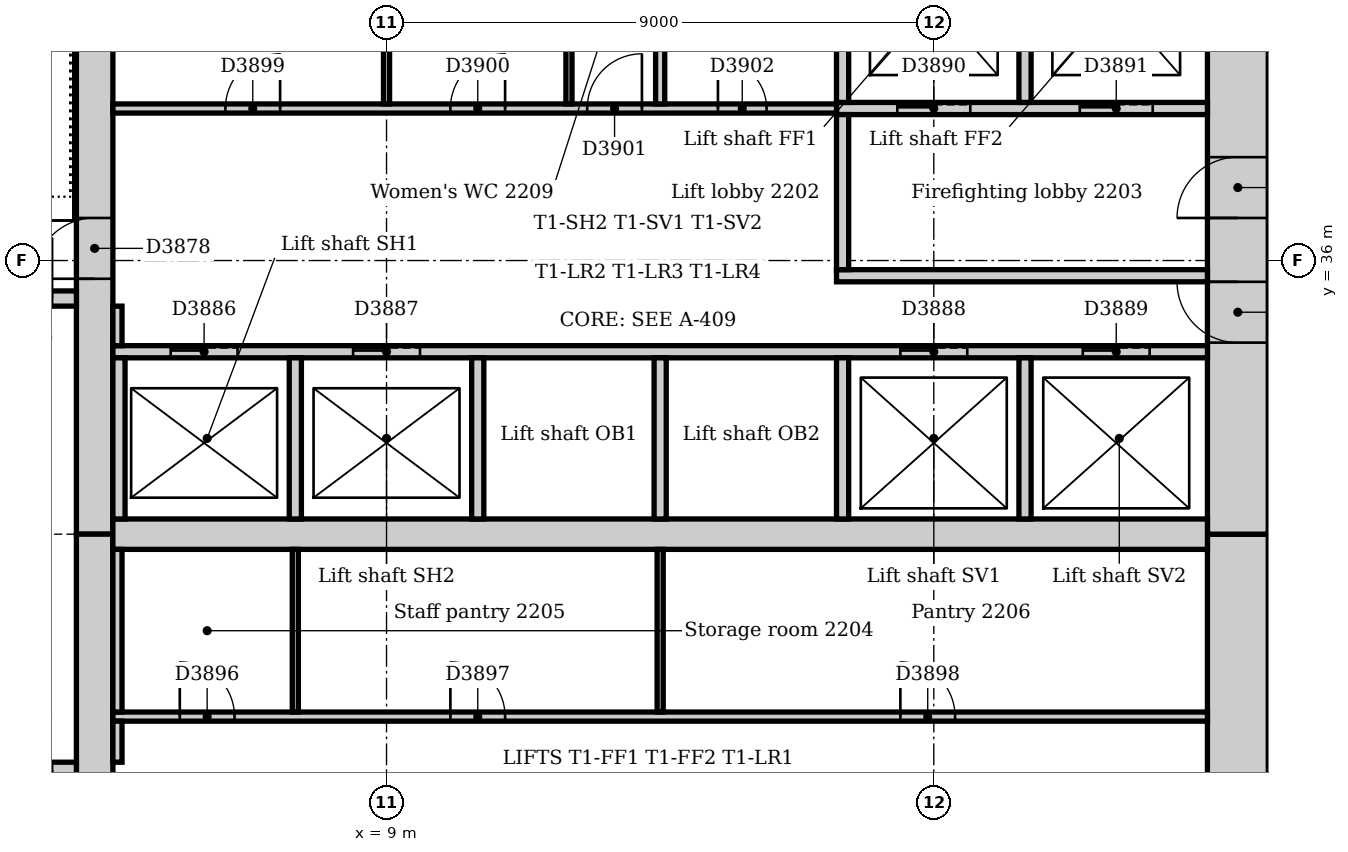
"""IFC4 building model, lengths in metres.
Left out: names, types, materials, properties, quantities, classifications, styles, units other than length and angle.
Written with IfcOpenShell. Run it as: python <this file> out.ifc"""

import sys

from ifc_helpers import new_model, si_unit, direction, frame, frame_2d, origin, place, context, subcontext, project, spatial, rectangle, extrude, element, fill, save


model = new_model("IFC4")
c1 = context("Model", 3, precision=1e-05, world=origin(), true_north=direction((0.0, 1.0)))
c2 = subcontext(c1, "Body", "Model", "MODEL_VIEW")
j1 = project(units=[si_unit("LENGTHUNIT", "METRE"), si_unit("PLANEANGLEUNIT", "RADIAN")], contexts=[c1])
p1 = place(None, origin())
s1 = spatial("IfcSite", under=j1, at=p1, CompositionType="ELEMENT")
p2 = place(p1, origin())
s2 = spatial("IfcBuilding", under=s1, at=p2, CompositionType="ELEMENT")
p3 = place(p2, frame((0.0, 0.0, 95.0)))
s3 = spatial("IfcBuildingStorey", under=s2, at=p3, CompositionType="ELEMENT", Elevation=95.0)
p4 = place(p3, frame((23.0, 21.0, 0.0), z_axis=(0.0, 0.0, 1.0), x_axis=(0.0, 1.0, 0.0)))
e1 = element("IfcWall", 1, at=p4, inside=s3, PredefinedType="SOLIDWALL", context=c2, shape_type="SweptSolid", body=[
    extrude(rectangle(XDim=10.5, YDim=1.0, at=frame_2d((5.25, 0.0))), origin(), (0.0, 0.0, 1.0), 5.0),
])
p5 = place(p4, frame((4.35, 0.0, 0.0)))
e2 = element("IfcOpeningElement", 2, at=p5, cuts=e1, PredefinedType="OPENING", context=c2, shape_type="SweptSolid", body=[
    extrude(rectangle(XDim=1.8, YDim=2.1, at=frame_2d((0.9, 1.05))), frame((0.0, 0.51, 0.0), z_axis=(0.0, -1.0, 0.0), x_axis=(1.0, 0.0, 0.0)), (0.0, 0.0, 1.0), 1.02),
])
p6 = place(p3, frame((23.0, 31.5, 0.0), z_axis=(0.0, 0.0, 1.0), x_axis=(0.0, 1.0, 0.0)))
e3 = element("IfcWall", 3, at=p6, inside=s3, PredefinedType="SOLIDWALL", context=c2, shape_type="SweptSolid", body=[
    extrude(rectangle(XDim=10.5, YDim=1.0, at=frame_2d((5.25, 0.0))), origin(), (0.0, 0.0, 1.0), 5.0),
])
p7 = place(p6, frame((3.15, 0.0, 0.0)))
e4 = element("IfcOpeningElement", 4, at=p7, cuts=e3, PredefinedType="OPENING", context=c2, shape_type="SweptSolid", body=[
    extrude(rectangle(XDim=1.0, YDim=2.1, at=frame_2d((0.5, 1.05))), frame((0.0, 0.51, 0.0), z_axis=(0.0, -1.0, 0.0), x_axis=(1.0, 0.0, 0.0)), (0.0, 0.0, 1.0), 1.02),
])
p8 = place(p6, frame((5.2, 0.0, 0.0)))
e5 = element("IfcOpeningElement", 5, at=p8, cuts=e3, PredefinedType="OPENING", context=c2, shape_type="SweptSolid", body=[
    extrude(rectangle(XDim=1.0, YDim=2.1, at=frame_2d((0.5, 1.05))), frame((0.0, 0.51, 0.0), z_axis=(0.0, -1.0, 0.0), x_axis=(1.0, 0.0, 0.0)), (0.0, 0.0, 1.0), 1.02),
])
p9 = place(p3, frame((4.2, 42.0, 0.0), z_axis=(0.0, 0.0, 1.0), x_axis=(0.0, -1.0, 0.0)))
e6 = element("IfcWall", 6, at=p9, inside=s3, PredefinedType="SOLIDWALL", context=c2, shape_type="SweptSolid", body=[
    extrude(rectangle(XDim=10.5, YDim=0.6, at=frame_2d((5.25, 0.0))), origin(), (0.0, 0.0, 1.0), 5.0),
])
p10 = place(p9, frame((5.3, 0.0, 0.0)))
e7 = element("IfcOpeningElement", 7, at=p10, cuts=e6, PredefinedType="OPENING", context=c2, shape_type="SweptSolid", body=[
    extrude(rectangle(XDim=1.0, YDim=2.1, at=frame_2d((0.5, 1.05))), frame((0.0, 0.31, 0.0), z_axis=(0.0, -1.0, 0.0), x_axis=(1.0, 0.0, 0.0)), (0.0, 0.0, 1.0), 0.62),
])
p11 = place(p3, frame((4.2, 31.5, 0.0), z_axis=(0.0, 0.0, 1.0), x_axis=(0.0, -1.0, 0.0)))
e8 = element("IfcWall", 8, at=p11, inside=s3, PredefinedType="SOLIDWALL", context=c2, shape_type="SweptSolid", body=[
    extrude(rectangle(XDim=10.5, YDim=0.6, at=frame_2d((5.25, 0.0))), origin(), (0.0, 0.0, 1.0), 5.0),
])
p12 = place(p11, frame((4.25, 0.0, 0.0)))
e9 = element("IfcOpeningElement", 9, at=p12, cuts=e8, PredefinedType="OPENING", context=c2, shape_type="SweptSolid", body=[
    extrude(rectangle(XDim=1.0, YDim=2.1, at=frame_2d((0.5, 1.05))), frame((0.0, 0.31, 0.0), z_axis=(0.0, -1.0, 0.0), x_axis=(1.0, 0.0, 0.0)), (0.0, 0.0, 1.0), 0.62),
])
p13 = place(p3, frame((4.5, 31.5, 0.0), z_axis=(0.0, 0.0, 1.0), x_axis=(1.0, 0.0, 0.0)))
e10 = element("IfcWall", 10, at=p13, inside=s3, PredefinedType="SOLIDWALL", context=c2, shape_type="SweptSolid", body=[
    extrude(rectangle(XDim=18.0, YDim=0.5, at=frame_2d((9.0, 0.0))), origin(), (0.0, 0.0, 1.0), 5.0),
])
p14 = place(p3, frame((3.9, 27.625, 0.0), z_axis=(0.0, 0.0, 1.0), x_axis=(-1.0, 0.0, 0.0)))
e11 = element("IfcWall", 11, at=p14, inside=s3, PredefinedType="SOLIDWALL", context=c2, shape_type="SweptSolid", body=[
    extrude(rectangle(XDim=3.54, YDim=0.25, at=frame_2d((1.77, 0.0))), origin(), (0.0, 0.0, 1.0), 5.0),
])
p15 = place(p14, frame((0.4, 0.0, 0.0)))
e12 = element("IfcOpeningElement", 12, at=p15, cuts=e11, PredefinedType="OPENING", context=c2, shape_type="SweptSolid", body=[
    extrude(rectangle(XDim=1.0, YDim=2.1, at=frame_2d((0.5, 1.05))), frame((0.0, 0.135, 0.0), z_axis=(0.0, -1.0, 0.0), x_axis=(1.0, 0.0, 0.0)), (0.0, 0.0, 1.0), 0.27),
])
p16 = place(p3, frame((0.36, 35.375, 0.0), z_axis=(0.0, 0.0, 1.0), x_axis=(1.0, 0.0, 0.0)))
e13 = element("IfcWall", 13, at=p16, inside=s3, PredefinedType="SOLIDWALL", context=c2, shape_type="SweptSolid", body=[
    extrude(rectangle(XDim=3.54, YDim=0.25, at=frame_2d((1.77, 0.0))), origin(), (0.0, 0.0, 1.0), 5.0),
])
p17 = place(p16, frame((2.14, 0.0, 0.0)))
e14 = element("IfcOpeningElement", 14, at=p17, cuts=e13, PredefinedType="OPENING", context=c2, shape_type="SweptSolid", body=[
    extrude(rectangle(XDim=1.0, YDim=2.1, at=frame_2d((0.5, 1.05))), frame((0.0, 0.135, 0.0), z_axis=(0.0, -1.0, 0.0), x_axis=(1.0, 0.0, 0.0)), (0.0, 0.0, 1.0), 0.27),
])
p18 = place(p3, frame((16.4, 35.75, 0.0), z_axis=(0.0, 0.0, 1.0), x_axis=(1.0, 0.0, 0.0)))
e15 = element("IfcWall", 15, at=p18, inside=s3, PredefinedType="PARTITIONING", context=c2, shape_type="SweptSolid", body=[
    extrude(rectangle(XDim=6.1, YDim=0.2, at=frame_2d((3.05, 0.0))), origin(), (0.0, 0.0, 1.0), 4.85),
])
p19 = place(p3, frame((16.4, 38.5, 0.0), z_axis=(0.0, 0.0, 1.0), x_axis=(1.0, 0.0, 0.0)))
e16 = element("IfcWall", 16, at=p19, inside=s3, PredefinedType="PARTITIONING", context=c2, shape_type="SweptSolid", body=[
    extrude(rectangle(XDim=6.1, YDim=0.2, at=frame_2d((3.05, 0.0))), origin(), (0.0, 0.0, 1.0), 4.85),
])
p20 = place(p19, frame((1.0, 0.0, 0.0)))
e17 = element("IfcOpeningElement", 17, at=p20, cuts=e16, PredefinedType="OPENING", context=c2, shape_type="SweptSolid", body=[
    extrude(rectangle(XDim=1.2, YDim=2.1, at=frame_2d((0.6, 1.05))), frame((0.0, 0.11, 0.0), z_axis=(0.0, -1.0, 0.0), x_axis=(1.0, 0.0, 0.0)), (0.0, 0.0, 1.0), 0.22),
])
p21 = place(p19, frame((4.0, 0.0, 0.0)))
e18 = element("IfcOpeningElement", 18, at=p21, cuts=e16, PredefinedType="OPENING", context=c2, shape_type="SweptSolid", body=[
    extrude(rectangle(XDim=1.2, YDim=2.1, at=frame_2d((0.6, 1.05))), frame((0.0, 0.11, 0.0), z_axis=(0.0, -1.0, 0.0), x_axis=(1.0, 0.0, 0.0)), (0.0, 0.0, 1.0), 0.22),
])
p22 = place(p3, frame((16.5, 35.85, 0.0), z_axis=(0.0, 0.0, 1.0), x_axis=(0.0, 1.0, 0.0)))
e19 = element("IfcWall", 19, at=p22, inside=s3, PredefinedType="PARTITIONING", context=c2, shape_type="SweptSolid", body=[
    extrude(rectangle(XDim=2.55, YDim=0.2, at=frame_2d((1.275, 0.0))), origin(), (0.0, 0.0, 1.0), 4.85),
])
p23 = place(p3, frame((4.5, 34.5, 0.0), z_axis=(0.0, 0.0, 1.0), x_axis=(1.0, 0.0, 0.0)))
e20 = element("IfcWall", 20, at=p23, inside=s3, PredefinedType="PARTITIONING", context=c2, shape_type="SweptSolid", body=[
    extrude(rectangle(XDim=18.0, YDim=0.2, at=frame_2d((9.0, 0.0))), origin(), (0.0, 0.0, 1.0), 4.85),
])
p24 = place(p23, frame((0.95, 0.0, 0.0)))
e21 = element("IfcOpeningElement", 21, at=p24, cuts=e20, PredefinedType="OPENING", context=c2, shape_type="SweptSolid", body=[
    extrude(rectangle(XDim=1.1, YDim=2.1, at=frame_2d((0.55, 1.05))), frame((0.0, 0.11, 0.0), z_axis=(0.0, -1.0, 0.0), x_axis=(1.0, 0.0, 0.0)), (0.0, 0.0, 1.0), 0.22),
])
p25 = place(p23, frame((3.95, 0.0, 0.0)))
e22 = element("IfcOpeningElement", 22, at=p25, cuts=e20, PredefinedType="OPENING", context=c2, shape_type="SweptSolid", body=[
    extrude(rectangle(XDim=1.1, YDim=2.1, at=frame_2d((0.55, 1.05))), frame((0.0, 0.11, 0.0), z_axis=(0.0, -1.0, 0.0), x_axis=(1.0, 0.0, 0.0)), (0.0, 0.0, 1.0), 0.22),
])
p26 = place(p23, frame((12.95, 0.0, 0.0)))
e23 = element("IfcOpeningElement", 23, at=p26, cuts=e20, PredefinedType="OPENING", context=c2, shape_type="SweptSolid", body=[
    extrude(rectangle(XDim=1.1, YDim=2.1, at=frame_2d((0.55, 1.05))), frame((0.0, 0.11, 0.0), z_axis=(0.0, -1.0, 0.0), x_axis=(1.0, 0.0, 0.0)), (0.0, 0.0, 1.0), 0.22),
])
p27 = place(p23, frame((15.95, 0.0, 0.0)))
e24 = element("IfcOpeningElement", 24, at=p27, cuts=e20, PredefinedType="OPENING", context=c2, shape_type="SweptSolid", body=[
    extrude(rectangle(XDim=1.1, YDim=2.1, at=frame_2d((0.55, 1.05))), frame((0.0, 0.11, 0.0), z_axis=(0.0, -1.0, 0.0), x_axis=(1.0, 0.0, 0.0)), (0.0, 0.0, 1.0), 0.22),
])
for number, where, z_axis, x_axis in (
    (25, (16.5, 38.6, 0.0), (0.0, 0.0, 1.0), (0.0, 1.0, 0.0)),
    (26, (19.5, 38.6, 0.0), (0.0, 0.0, 1.0), (0.0, 1.0, 0.0)),
):
    element("IfcWall", number, at=place(p3, frame(where, z_axis=z_axis, x_axis=x_axis)), inside=s3, PredefinedType="PARTITIONING", context=c2, shape_type="SweptSolid", body=[
        extrude(rectangle(XDim=3.4, YDim=0.2, at=frame_2d((1.7, 0.0))), origin(), (0.0, 0.0, 1.0), 4.85),
    ])
for number, where, z_axis, x_axis in (
    (27, (4.6, 31.75, 0.0), (0.0, 0.0, 1.0), (0.0, 1.0, 0.0)),
    (28, (7.5, 31.75, 0.0), (0.0, 0.0, 1.0), (0.0, 1.0, 0.0)),
    (29, (10.5, 31.75, 0.0), (0.0, 0.0, 1.0), (0.0, 1.0, 0.0)),
    (30, (13.5, 31.75, 0.0), (0.0, 0.0, 1.0), (0.0, 1.0, 0.0)),
    (31, (16.5, 31.75, 0.0), (0.0, 0.0, 1.0), (0.0, 1.0, 0.0)),
    (32, (19.5, 31.75, 0.0), (0.0, 0.0, 1.0), (0.0, 1.0, 0.0)),
):
    element("IfcWall", number, at=place(p3, frame(where, z_axis=z_axis, x_axis=x_axis)), inside=s3, PredefinedType="PARTITIONING", context=c2, shape_type="SweptSolid", body=[
        extrude(rectangle(XDim=2.65, YDim=0.2, at=frame_2d((1.325, 0.0))), origin(), (0.0, 0.0, 1.0), 4.85),
    ])
p28 = place(p3, frame((4.5, 28.5, 0.0), z_axis=(0.0, 0.0, 1.0), x_axis=(1.0, 0.0, 0.0)))
e33 = element("IfcWall", 33, at=p28, inside=s3, PredefinedType="PARTITIONING", context=c2, shape_type="SweptSolid", body=[
    extrude(rectangle(XDim=18.0, YDim=0.15, at=frame_2d((9.0, 0.0))), origin(), (0.0, 0.0, 1.0), 4.85),
])
p29 = place(p28, frame((1.1, 0.0, 0.0)))
e34 = element("IfcOpeningElement", 34, at=p29, cuts=e33, PredefinedType="OPENING", context=c2, shape_type="SweptSolid", body=[
    extrude(rectangle(XDim=0.9, YDim=2.1, at=frame_2d((0.45, 1.05))), frame((0.0, 0.085, 0.0), z_axis=(0.0, -1.0, 0.0), x_axis=(1.0, 0.0, 0.0)), (0.0, 0.0, 1.0), 0.17),
])
p30 = place(p28, frame((5.55, 0.0, 0.0)))
e35 = element("IfcOpeningElement", 35, at=p30, cuts=e33, PredefinedType="OPENING", context=c2, shape_type="SweptSolid", body=[
    extrude(rectangle(XDim=0.9, YDim=2.1, at=frame_2d((0.45, 1.05))), frame((0.0, 0.085, 0.0), z_axis=(0.0, -1.0, 0.0), x_axis=(1.0, 0.0, 0.0)), (0.0, 0.0, 1.0), 0.17),
])
p31 = place(p28, frame((12.95, 0.0, 0.0)))
e36 = element("IfcOpeningElement", 36, at=p31, cuts=e33, PredefinedType="OPENING", context=c2, shape_type="SweptSolid", body=[
    extrude(rectangle(XDim=0.9, YDim=2.1, at=frame_2d((0.45, 1.05))), frame((0.0, 0.085, 0.0), z_axis=(0.0, -1.0, 0.0), x_axis=(1.0, 0.0, 0.0)), (0.0, 0.0, 1.0), 0.17),
])
p32 = place(p3, frame((4.5, 38.5, 0.0), z_axis=(0.0, 0.0, 1.0), x_axis=(1.0, 0.0, 0.0)))
e37 = element("IfcWall", 37, at=p32, inside=s3, PredefinedType="PARTITIONING", context=c2, shape_type="SweptSolid", body=[
    extrude(rectangle(XDim=11.9, YDim=0.15, at=frame_2d((5.95, 0.0))), origin(), (0.0, 0.0, 1.0), 4.85),
])
p33 = place(p32, frame((1.85, 0.0, 0.0)))
e38 = element("IfcOpeningElement", 38, at=p33, cuts=e37, PredefinedType="OPENING", context=c2, shape_type="SweptSolid", body=[
    extrude(rectangle(XDim=0.9, YDim=2.1, at=frame_2d((0.45, 1.05))), frame((0.0, 0.085, 0.0), z_axis=(0.0, -1.0, 0.0), x_axis=(1.0, 0.0, 0.0)), (0.0, 0.0, 1.0), 0.17),
])
p34 = place(p32, frame((5.55, 0.0, 0.0)))
e39 = element("IfcOpeningElement", 39, at=p34, cuts=e37, PredefinedType="OPENING", context=c2, shape_type="SweptSolid", body=[
    extrude(rectangle(XDim=0.9, YDim=2.1, at=frame_2d((0.45, 1.05))), frame((0.0, 0.085, 0.0), z_axis=(0.0, -1.0, 0.0), x_axis=(1.0, 0.0, 0.0)), (0.0, 0.0, 1.0), 0.17),
])
p35 = place(p32, frame((7.8, 0.0, 0.0)))
e40 = element("IfcOpeningElement", 40, at=p35, cuts=e37, PredefinedType="OPENING", context=c2, shape_type="SweptSolid", body=[
    extrude(rectangle(XDim=0.9, YDim=2.1, at=frame_2d((0.45, 1.05))), frame((0.0, 0.085, 0.0), z_axis=(0.0, -1.0, 0.0), x_axis=(1.0, 0.0, 0.0)), (0.0, 0.0, 1.0), 0.17),
])
p36 = place(p32, frame((9.95, 0.0, 0.0)))
e41 = element("IfcOpeningElement", 41, at=p36, cuts=e37, PredefinedType="OPENING", context=c2, shape_type="SweptSolid", body=[
    extrude(rectangle(XDim=0.8, YDim=2.1, at=frame_2d((0.4, 1.05))), frame((0.0, 0.085, 0.0), z_axis=(0.0, -1.0, 0.0), x_axis=(1.0, 0.0, 0.0)), (0.0, 0.0, 1.0), 0.17),
])
p37 = place(p3, frame((4.575, 27.75, 0.0), z_axis=(0.0, 0.0, 1.0), x_axis=(0.0, 1.0, 0.0)))
e42 = element("IfcWall", 42, at=p37, inside=s3, PredefinedType="PARTITIONING", context=c2, shape_type="SweptSolid", body=[
    extrude(rectangle(XDim=0.675, YDim=0.15, at=frame_2d((0.338, 0.0))), origin(), (0.0, 0.0, 1.0), 4.85),
])
p38 = place(p3, frame((4.575, 28.575, 0.0), z_axis=(0.0, 0.0, 1.0), x_axis=(0.0, 1.0, 0.0)))
e43 = element("IfcWall", 43, at=p38, inside=s3, PredefinedType="PARTITIONING", context=c2, shape_type="SweptSolid", body=[
    extrude(rectangle(XDim=2.675, YDim=0.15, at=frame_2d((1.337, 0.0))), origin(), (0.0, 0.0, 1.0), 4.85),
])
p39 = place(p3, frame((4.575, 34.6, 0.0), z_axis=(0.0, 0.0, 1.0), x_axis=(0.0, 1.0, 0.0)))
e44 = element("IfcWall", 44, at=p39, inside=s3, PredefinedType="PARTITIONING", context=c2, shape_type="SweptSolid", body=[
    extrude(rectangle(XDim=0.65, YDim=0.15, at=frame_2d((0.325, 0.0))), origin(), (0.0, 0.0, 1.0), 4.85),
])
p40 = place(p3, frame((13.5, 38.575, 0.0), z_axis=(0.0, 0.0, 1.0), x_axis=(0.0, 1.0, 0.0)))
e45 = element("IfcWall", 45, at=p40, inside=s3, PredefinedType="PARTITIONING", context=c2, shape_type="SweptSolid", body=[
    extrude(rectangle(XDim=3.425, YDim=0.15, at=frame_2d((1.712, 0.0))), origin(), (0.0, 0.0, 1.0), 4.85),
])
for number, where, z_axis, x_axis in (
    (46, (9.0, 38.575, 0.0), (0.0, 0.0, 1.0), (0.0, 1.0, 0.0)),
    (47, (12.0, 38.575, 0.0), (0.0, 0.0, 1.0), (0.0, 1.0, 0.0)),
):
    element("IfcWall", number, at=place(p3, frame(where, z_axis=z_axis, x_axis=x_axis)), inside=s3, PredefinedType="PARTITIONING", context=c2, shape_type="SweptSolid", body=[
        extrude(rectangle(XDim=3.425, YDim=0.1, at=frame_2d((1.712, 0.0))), origin(), (0.0, 0.0, 1.0), 4.85),
    ])
for number, where, z_axis, x_axis in (
    (48, (7.5, 28.575, 0.0), (0.0, 0.0, 1.0), (0.0, 1.0, 0.0)),
    (49, (13.5, 28.575, 0.0), (0.0, 0.0, 1.0), (0.0, 1.0, 0.0)),
):
    element("IfcWall", number, at=place(p3, frame(where, z_axis=z_axis, x_axis=x_axis)), inside=s3, PredefinedType="PARTITIONING", context=c2, shape_type="SweptSolid", body=[
        extrude(rectangle(XDim=2.675, YDim=0.1, at=frame_2d((1.337, 0.0))), origin(), (0.0, 0.0, 1.0), 4.85),
    ])
p41 = place(p10, frame((1.0, 0.0, 0.0), z_axis=(0.0, 0.0, 1.0), x_axis=(-1.0, 0.0, 0.0)))
e50 = element("IfcDoor", 50, at=p41, inside=s3, OperationType="SINGLE_SWING_LEFT", PredefinedType="DOOR", context=c2, shape_type="SweptSolid", body=[
    extrude(rectangle(XDim=1.0, YDim=2.1, at=frame_2d((0.5, 1.05))), frame((0.0, 0.025, 0.0), z_axis=(0.0, -1.0, 0.0), x_axis=(1.0, 0.0, 0.0)), (0.0, 0.0, 1.0), 0.05),
])
fill(e7, e50)
p42 = place(p24, origin())
e51 = element("IfcDoor", 51, at=p42, inside=s3, OperationType="SLIDING_TO_LEFT", PredefinedType="DOOR", context=c2, shape_type="SweptSolid", body=[
    extrude(rectangle(XDim=1.1, YDim=2.1, at=frame_2d((0.55, 1.05))), frame((0.0, 0.025, 0.0), z_axis=(0.0, -1.0, 0.0), x_axis=(1.0, 0.0, 0.0)), (0.0, 0.0, 1.0), 0.05),
])
fill(e21, e51)
p43 = place(p25, origin())
e52 = element("IfcDoor", 52, at=p43, inside=s3, OperationType="SLIDING_TO_LEFT", PredefinedType="DOOR", context=c2, shape_type="SweptSolid", body=[
    extrude(rectangle(XDim=1.1, YDim=2.1, at=frame_2d((0.55, 1.05))), frame((0.0, 0.025, 0.0), z_axis=(0.0, -1.0, 0.0), x_axis=(1.0, 0.0, 0.0)), (0.0, 0.0, 1.0), 0.05),
])
fill(e22, e52)
p44 = place(p26, origin())
e53 = element("IfcDoor", 53, at=p44, inside=s3, OperationType="SLIDING_TO_LEFT", PredefinedType="DOOR", context=c2, shape_type="SweptSolid", body=[
    extrude(rectangle(XDim=1.1, YDim=2.1, at=frame_2d((0.55, 1.05))), frame((0.0, 0.025, 0.0), z_axis=(0.0, -1.0, 0.0), x_axis=(1.0, 0.0, 0.0)), (0.0, 0.0, 1.0), 0.05),
])
fill(e23, e53)
p45 = place(p27, origin())
e54 = element("IfcDoor", 54, at=p45, inside=s3, OperationType="SLIDING_TO_LEFT", PredefinedType="DOOR", context=c2, shape_type="SweptSolid", body=[
    extrude(rectangle(XDim=1.1, YDim=2.1, at=frame_2d((0.55, 1.05))), frame((0.0, 0.025, 0.0), z_axis=(0.0, -1.0, 0.0), x_axis=(1.0, 0.0, 0.0)), (0.0, 0.0, 1.0), 0.05),
])
fill(e24, e54)
p46 = place(p20, origin())
e55 = element("IfcDoor", 55, at=p46, inside=s3, OperationType="SLIDING_TO_LEFT", PredefinedType="DOOR", context=c2, shape_type="SweptSolid", body=[
    extrude(rectangle(XDim=1.2, YDim=2.1, at=frame_2d((0.6, 1.05))), frame((0.0, 0.025, 0.0), z_axis=(0.0, -1.0, 0.0), x_axis=(1.0, 0.0, 0.0)), (0.0, 0.0, 1.0), 0.05),
])
fill(e17, e55)
p47 = place(p21, origin())
e56 = element("IfcDoor", 56, at=p47, inside=s3, OperationType="SLIDING_TO_LEFT", PredefinedType="DOOR", context=c2, shape_type="SweptSolid", body=[
    extrude(rectangle(XDim=1.2, YDim=2.1, at=frame_2d((0.6, 1.05))), frame((0.0, 0.025, 0.0), z_axis=(0.0, -1.0, 0.0), x_axis=(1.0, 0.0, 0.0)), (0.0, 0.0, 1.0), 0.05),
])
fill(e18, e56)
p48 = place(p7, origin())
e57 = element("IfcDoor", 57, at=p48, inside=s3, OperationType="SINGLE_SWING_RIGHT", PredefinedType="DOOR", context=c2, shape_type="SweptSolid", body=[
    extrude(rectangle(XDim=1.0, YDim=2.1, at=frame_2d((0.5, 1.05))), frame((0.0, 0.025, 0.0), z_axis=(0.0, -1.0, 0.0), x_axis=(1.0, 0.0, 0.0)), (0.0, 0.0, 1.0), 0.05),
])
fill(e4, e57)
p49 = place(p8, origin())
e58 = element("IfcDoor", 58, at=p49, inside=s3, OperationType="SINGLE_SWING_LEFT", PredefinedType="DOOR", context=c2, shape_type="SweptSolid", body=[
    extrude(rectangle(XDim=1.0, YDim=2.1, at=frame_2d((0.5, 1.05))), frame((0.0, 0.025, 0.0), z_axis=(0.0, -1.0, 0.0), x_axis=(1.0, 0.0, 0.0)), (0.0, 0.0, 1.0), 0.05),
])
fill(e5, e58)
p50 = place(p29, origin())
e59 = element("IfcDoor", 59, at=p50, inside=s3, OperationType="SINGLE_SWING_LEFT", PredefinedType="DOOR", context=c2, shape_type="SweptSolid", body=[
    extrude(rectangle(XDim=0.9, YDim=2.1, at=frame_2d((0.45, 1.05))), frame((0.0, 0.025, 0.0), z_axis=(0.0, -1.0, 0.0), x_axis=(1.0, 0.0, 0.0)), (0.0, 0.0, 1.0), 0.05),
])
fill(e34, e59)
p51 = place(p30, origin())
e60 = element("IfcDoor", 60, at=p51, inside=s3, OperationType="SINGLE_SWING_LEFT", PredefinedType="DOOR", context=c2, shape_type="SweptSolid", body=[
    extrude(rectangle(XDim=0.9, YDim=2.1, at=frame_2d((0.45, 1.05))), frame((0.0, 0.025, 0.0), z_axis=(0.0, -1.0, 0.0), x_axis=(1.0, 0.0, 0.0)), (0.0, 0.0, 1.0), 0.05),
])
fill(e35, e60)
p52 = place(p31, origin())
e61 = element("IfcDoor", 61, at=p52, inside=s3, OperationType="SINGLE_SWING_LEFT", PredefinedType="DOOR", context=c2, shape_type="SweptSolid", body=[
    extrude(rectangle(XDim=0.9, YDim=2.1, at=frame_2d((0.45, 1.05))), frame((0.0, 0.025, 0.0), z_axis=(0.0, -1.0, 0.0), x_axis=(1.0, 0.0, 0.0)), (0.0, 0.0, 1.0), 0.05),
])
fill(e36, e61)
p53 = place(p33, origin())
e62 = element("IfcDoor", 62, at=p53, inside=s3, OperationType="SINGLE_SWING_RIGHT", PredefinedType="DOOR", context=c2, shape_type="SweptSolid", body=[
    extrude(rectangle(XDim=0.9, YDim=2.1, at=frame_2d((0.45, 1.05))), frame((0.0, 0.025, 0.0), z_axis=(0.0, -1.0, 0.0), x_axis=(1.0, 0.0, 0.0)), (0.0, 0.0, 1.0), 0.05),
])
fill(e38, e62)
p54 = place(p34, origin())
e63 = element("IfcDoor", 63, at=p54, inside=s3, OperationType="SINGLE_SWING_RIGHT", PredefinedType="DOOR", context=c2, shape_type="SweptSolid", body=[
    extrude(rectangle(XDim=0.9, YDim=2.1, at=frame_2d((0.45, 1.05))), frame((0.0, 0.025, 0.0), z_axis=(0.0, -1.0, 0.0), x_axis=(1.0, 0.0, 0.0)), (0.0, 0.0, 1.0), 0.05),
])
fill(e39, e63)
p55 = place(p35, origin())
e64 = element("IfcDoor", 64, at=p55, inside=s3, OperationType="SINGLE_SWING_RIGHT", PredefinedType="DOOR", context=c2, shape_type="SweptSolid", body=[
    extrude(rectangle(XDim=0.9, YDim=2.1, at=frame_2d((0.45, 1.05))), frame((0.0, 0.025, 0.0), z_axis=(0.0, -1.0, 0.0), x_axis=(1.0, 0.0, 0.0)), (0.0, 0.0, 1.0), 0.05),
])
fill(e40, e64)
p56 = place(p36, origin())
e65 = element("IfcDoor", 65, at=p56, inside=s3, OperationType="SINGLE_SWING_LEFT", PredefinedType="DOOR", context=c2, shape_type="SweptSolid", body=[
    extrude(rectangle(XDim=0.8, YDim=2.1, at=frame_2d((0.4, 1.05))), frame((0.0, 0.025, 0.0), z_axis=(0.0, -1.0, 0.0), x_axis=(1.0, 0.0, 0.0)), (0.0, 0.0, 1.0), 0.05),
])
fill(e41, e65)
save(model, sys.argv[1])
